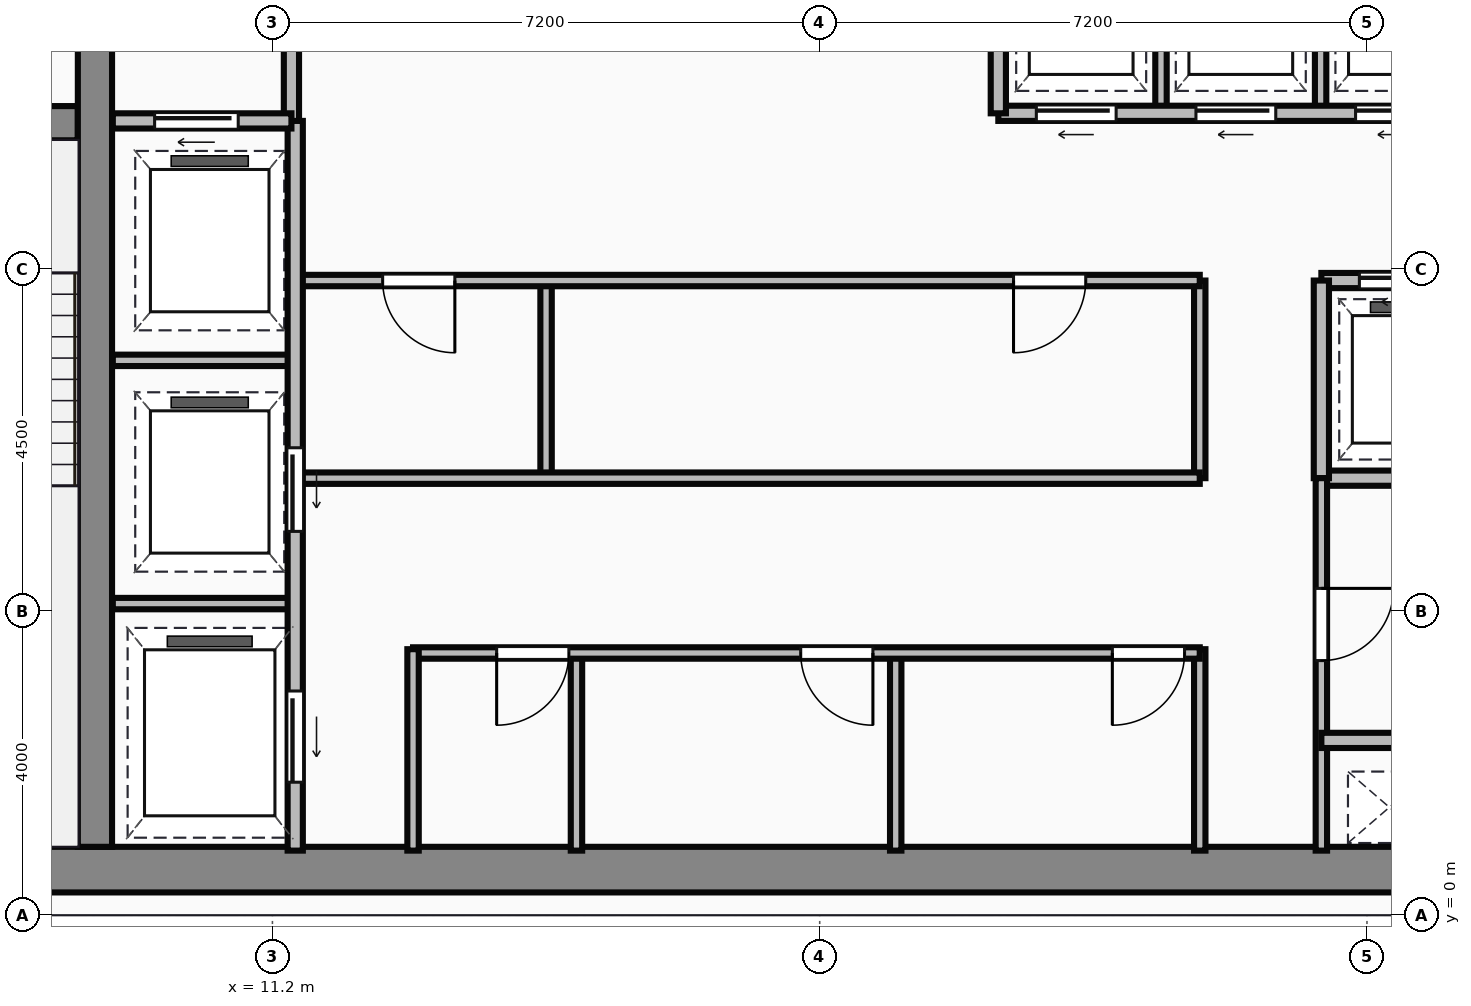
"""IFC4 building model, lengths in metres.
Left out: names, types, materials, properties, quantities, classifications, styles, units other than length and angle.
Written with IfcOpenShell. Run it as: python <this file> out.ifc"""

import sys

from ifc_helpers import new_model, si_unit, direction, frame, frame_2d, origin, place, context, subcontext, project, spatial, rectangle, extrude, source, transform, mapped, element, fill, save


model = new_model("IFC4")
c1 = context("Model", 3, precision=1e-05, world=origin(), true_north=direction((0.0, 1.0)))
c2 = subcontext(c1, "Body", "Model", "MODEL_VIEW")
j1 = project(units=[si_unit("LENGTHUNIT", "METRE"), si_unit("PLANEANGLEUNIT", "RADIAN")], contexts=[c1])
p1 = place(None, origin())
s1 = spatial("IfcSite", under=j1, at=p1, CompositionType="ELEMENT")
p2 = place(p1, origin())
s2 = spatial("IfcBuilding", under=s1, at=p2, CompositionType="ELEMENT")
p3 = place(p2, frame((0.0, 0.0, 240.55)))
s3 = spatial("IfcBuildingStorey", under=s2, at=p3, CompositionType="ELEMENT", Elevation=240.55)
m1 = source(origin(), c2, "Body", "SweptSolid", [
    extrude(rectangle(XDim=29.5, YDim=0.6, at=frame_2d((14.75, 0.0))), origin(), (0.0, 0.0, 1.0), 3.65),
])
p4 = place(p3, frame((4.5, 0.6, 0.0), z_axis=(0.0, 0.0, 1.0), x_axis=(1.0, 0.0, 0.0)))
e1 = element("IfcWall", 1, at=p4, inside=s3, PredefinedType="SHEAR", context=c2, shape_type="MappedRepresentation", body=[
    mapped(m1, transform((0.0, 0.0, 0.0))),
])
m2 = source(origin(), c2, "Body", "SweptSolid", [
    extrude(rectangle(XDim=12.5, YDim=0.45, at=frame_2d((6.25, 0.0))), origin(), (0.0, 0.0, 1.0), 3.65),
])
p5 = place(p3, frame((8.865, 0.9, 0.0), z_axis=(0.0, 0.0, 1.0), x_axis=(0.0, 1.0, 0.0)))
e2 = element("IfcWall", 2, at=p5, inside=s3, PredefinedType="SHEAR", context=c2, shape_type="MappedRepresentation", body=[
    mapped(m2, transform((0.0, 0.0, 0.0))),
])
m3 = source(origin(), c2, "Body", "SweptSolid", [
    extrude(rectangle(XDim=3.39, YDim=0.45, at=frame_2d((1.695, 0.0))), origin(), (0.0, 0.0, 1.0), 3.65),
])
p6 = place(p3, frame((5.25, 10.42, 0.0), z_axis=(0.0, 0.0, 1.0), x_axis=(1.0, 0.0, 0.0)))
e3 = element("IfcWall", 3, at=p6, inside=s3, PredefinedType="SHEAR", context=c2, shape_type="MappedRepresentation", body=[
    mapped(m3, transform((0.0, 0.0, 0.0))),
])
p7 = place(p6, frame((1.05, 0.0, 0.0)))
e4 = element("IfcOpeningElement", 4, at=p7, cuts=e3, PredefinedType="OPENING", context=c2, shape_type="SweptSolid", body=[
    extrude(rectangle(XDim=1.1, YDim=2.15, at=frame_2d((0.55, 1.075))), frame((0.0, 0.235, 0.0), z_axis=(0.0, -1.0, 0.0), x_axis=(1.0, 0.0, 0.0)), (0.0, 0.0, 1.0), 0.47),
])
m4 = source(origin(), c2, "Body", "SweptSolid", [
    extrude(rectangle(XDim=3.18, YDim=0.2, at=frame_2d((1.59, 0.0))), origin(), (0.0, 0.0, 1.0), 3.4),
])
p8 = place(p3, frame((11.45, 10.42, 0.0), z_axis=(0.0, 0.0, 1.0), x_axis=(0.0, 1.0, 0.0)))
e5 = element("IfcWall", 5, at=p8, inside=s3, PredefinedType="PARTITIONING", context=c2, shape_type="MappedRepresentation", body=[
    mapped(m4, transform((0.0, 0.0, 0.0))),
])
m5 = source(origin(), c2, "Body", "SweptSolid", [
    extrude(rectangle(XDim=2.35, YDim=0.2, at=frame_2d((1.175, 0.0))), origin(), (0.0, 0.0, 1.0), 3.4),
])
p9 = place(p3, frame((9.1, 10.45, 0.0), z_axis=(0.0, 0.0, 1.0), x_axis=(1.0, 0.0, 0.0)))
e6 = element("IfcWall", 6, at=p9, inside=s3, PredefinedType="PARTITIONING", context=c2, shape_type="MappedRepresentation", body=[
    mapped(m5, transform((0.0, 0.0, 0.0))),
])
p10 = place(p9, frame((0.55, 0.0, 0.0)))
e7 = element("IfcOpeningElement", 7, at=p10, cuts=e6, PredefinedType="OPENING", context=c2, shape_type="SweptSolid", body=[
    extrude(rectangle(XDim=1.1, YDim=2.15, at=frame_2d((0.55, 1.075))), frame((0.0, 0.11, 0.0), z_axis=(0.0, -1.0, 0.0), x_axis=(1.0, 0.0, 0.0)), (0.0, 0.0, 1.0), 0.22),
])
m6 = source(origin(), c2, "Body", "SweptSolid", [
    extrude(rectangle(XDim=9.6, YDim=0.2, at=frame_2d((4.8, 0.0))), origin(), (0.0, 0.0, 1.0), 3.4),
])
p11 = place(p3, frame((11.5, 0.85, 0.0), z_axis=(0.0, 0.0, 1.0), x_axis=(0.0, 1.0, 0.0)))
e8 = element("IfcWall", 8, at=p11, inside=s3, PredefinedType="PARTITIONING", context=c2, shape_type="MappedRepresentation", body=[
    mapped(m6, transform((0.0, 0.0, 0.0))),
])
p12 = place(p11, frame((4.2, 0.0, 0.0)))
e9 = element("IfcOpeningElement", 9, at=p12, cuts=e8, PredefinedType="OPENING", context=c2, shape_type="SweptSolid", body=[
    extrude(rectangle(XDim=1.1, YDim=2.15, at=frame_2d((0.55, 1.075))), frame((0.0, 0.11, 0.0), z_axis=(0.0, -1.0, 0.0), x_axis=(1.0, 0.0, 0.0)), (0.0, 0.0, 1.0), 0.22),
])
p13 = place(p11, frame((0.9, 0.0, 0.0)))
e10 = element("IfcOpeningElement", 10, at=p13, cuts=e8, PredefinedType="OPENING", context=c2, shape_type="SweptSolid", body=[
    extrude(rectangle(XDim=1.2, YDim=2.15, at=frame_2d((0.6, 1.075))), frame((0.0, 0.11, 0.0), z_axis=(0.0, -1.0, 0.0), x_axis=(1.0, 0.0, 0.0)), (0.0, 0.0, 1.0), 0.22),
])
m7 = source(origin(), c2, "Body", "SweptSolid", [
    extrude(rectangle(XDim=2.4, YDim=0.15, at=frame_2d((1.2, 0.0))), origin(), (0.0, 0.0, 1.0), 3.4),
])
for number, where, z_axis, x_axis in (
    (11, (9.1, 4.1, 0.0), (0.0, 0.0, 1.0), (1.0, 0.0, 0.0)),
    (12, (9.1, 7.3, 0.0), (0.0, 0.0, 1.0), (1.0, 0.0, 0.0)),
):
    element("IfcWall", number, at=place(p3, frame(where, z_axis=z_axis, x_axis=x_axis)), inside=s3, PredefinedType="PARTITIONING", context=c2, shape_type="MappedRepresentation", body=[
        mapped(m7, transform((0.0, 0.0, 0.0))),
    ])
m8 = source(origin(), c2, "Body", "SweptSolid", [
    extrude(rectangle(XDim=2.65, YDim=0.15, at=frame_2d((1.325, 0.0))), origin(), (0.0, 0.0, 1.0), 3.4),
])
p14 = place(p3, frame((13.05, 0.85, 0.0), z_axis=(0.0, 0.0, 1.0), x_axis=(0.0, 1.0, 0.0)))
e13 = element("IfcWall", 13, at=p14, inside=s3, PredefinedType="PARTITIONING", context=c2, shape_type="MappedRepresentation", body=[
    mapped(m8, transform((0.0, 0.0, 0.0))),
])
m9 = source(origin(), c2, "Body", "SweptSolid", [
    extrude(rectangle(XDim=10.35, YDim=0.15, at=frame_2d((5.175, 0.0))), origin(), (0.0, 0.0, 1.0), 3.4),
])
p15 = place(p3, frame((13.05, 3.45, 0.0), z_axis=(0.0, 0.0, 1.0), x_axis=(1.0, 0.0, 0.0)))
e14 = element("IfcWall", 14, at=p15, inside=s3, PredefinedType="PARTITIONING", context=c2, shape_type="MappedRepresentation", body=[
    mapped(m9, transform((0.0, 0.0, 0.0))),
])
p16 = place(p15, frame((1.1, 0.0, 0.0)))
e15 = element("IfcOpeningElement", 15, at=p16, cuts=e14, PredefinedType="OPENING", context=c2, shape_type="SweptSolid", body=[
    extrude(rectangle(XDim=0.95, YDim=2.15, at=frame_2d((0.475, 1.075))), frame((0.0, 0.085, 0.0), z_axis=(0.0, -1.0, 0.0), x_axis=(1.0, 0.0, 0.0)), (0.0, 0.0, 1.0), 0.17),
])
p17 = place(p15, frame((5.1, 0.0, 0.0)))
e16 = element("IfcOpeningElement", 16, at=p17, cuts=e14, PredefinedType="OPENING", context=c2, shape_type="SweptSolid", body=[
    extrude(rectangle(XDim=0.95, YDim=2.15, at=frame_2d((0.475, 1.075))), frame((0.0, 0.085, 0.0), z_axis=(0.0, -1.0, 0.0), x_axis=(1.0, 0.0, 0.0)), (0.0, 0.0, 1.0), 0.17),
])
p18 = place(p15, frame((9.2, 0.0, 0.0)))
e17 = element("IfcOpeningElement", 17, at=p18, cuts=e14, PredefinedType="OPENING", context=c2, shape_type="SweptSolid", body=[
    extrude(rectangle(XDim=0.95, YDim=2.15, at=frame_2d((0.475, 1.075))), frame((0.0, 0.085, 0.0), z_axis=(0.0, -1.0, 0.0), x_axis=(1.0, 0.0, 0.0)), (0.0, 0.0, 1.0), 0.17),
])
p19 = place(p3, frame((23.4, 0.85, 0.0), z_axis=(0.0, 0.0, 1.0), x_axis=(0.0, 1.0, 0.0)))
e18 = element("IfcWall", 18, at=p19, inside=s3, PredefinedType="PARTITIONING", context=c2, shape_type="MappedRepresentation", body=[
    mapped(m8, transform((0.0, 0.0, 0.0))),
])
m10 = source(origin(), c2, "Body", "SweptSolid", [
    extrude(rectangle(XDim=2.6, YDim=0.15, at=frame_2d((1.3, 0.0))), origin(), (0.0, 0.0, 1.0), 3.4),
])
for number, where, z_axis, x_axis in (
    (19, (15.2, 0.85, 0.0), (0.0, 0.0, 1.0), (0.0, 1.0, 0.0)),
    (20, (19.4, 0.85, 0.0), (0.0, 0.0, 1.0), (0.0, 1.0, 0.0)),
):
    element("IfcWall", number, at=place(p3, frame(where, z_axis=z_axis, x_axis=x_axis)), inside=s3, PredefinedType="PARTITIONING", context=c2, shape_type="MappedRepresentation", body=[
        mapped(m10, transform((0.0, 0.0, 0.0))),
    ])
m11 = source(origin(), c2, "Body", "SweptSolid", [
    extrude(rectangle(XDim=11.85, YDim=0.15, at=frame_2d((5.925, 0.0))), origin(), (0.0, 0.0, 1.0), 3.4),
])
p20 = place(p3, frame((11.55, 5.75, 0.0), z_axis=(0.0, 0.0, 1.0), x_axis=(1.0, 0.0, 0.0)))
e21 = element("IfcWall", 21, at=p20, inside=s3, PredefinedType="PARTITIONING", context=c2, shape_type="MappedRepresentation", body=[
    mapped(m11, transform((0.0, 0.0, 0.0))),
])
p21 = place(p3, frame((11.55, 8.35, 0.0), z_axis=(0.0, 0.0, 1.0), x_axis=(1.0, 0.0, 0.0)))
e22 = element("IfcWall", 22, at=p21, inside=s3, PredefinedType="PARTITIONING", context=c2, shape_type="MappedRepresentation", body=[
    mapped(m11, transform((0.0, 0.0, 0.0))),
])
p22 = place(p21, frame((1.1, 0.0, 0.0)))
e23 = element("IfcOpeningElement", 23, at=p22, cuts=e22, PredefinedType="OPENING", context=c2, shape_type="SweptSolid", body=[
    extrude(rectangle(XDim=0.95, YDim=2.15, at=frame_2d((0.475, 1.075))), frame((0.0, 0.085, 0.0), z_axis=(0.0, -1.0, 0.0), x_axis=(1.0, 0.0, 0.0)), (0.0, 0.0, 1.0), 0.17),
])
p23 = place(p21, frame((9.4, 0.0, 0.0)))
e24 = element("IfcOpeningElement", 24, at=p23, cuts=e22, PredefinedType="OPENING", context=c2, shape_type="SweptSolid", body=[
    extrude(rectangle(XDim=0.95, YDim=2.15, at=frame_2d((0.475, 1.075))), frame((0.0, 0.085, 0.0), z_axis=(0.0, -1.0, 0.0), x_axis=(1.0, 0.0, 0.0)), (0.0, 0.0, 1.0), 0.17),
])
m12 = source(origin(), c2, "Body", "SweptSolid", [
    extrude(rectangle(XDim=2.6, YDim=0.15, at=frame_2d((1.3, 0.0))), origin(), (0.0, 0.0, 1.0), 3.4),
])
p24 = place(p3, frame((23.4, 5.75, 0.0), z_axis=(0.0, 0.0, 1.0), x_axis=(0.0, 1.0, 0.0)))
e25 = element("IfcWall", 25, at=p24, inside=s3, PredefinedType="PARTITIONING", context=c2, shape_type="MappedRepresentation", body=[
    mapped(m12, transform((0.0, 0.0, 0.0))),
])
m13 = source(origin(), c2, "Body", "SweptSolid", [
    extrude(rectangle(XDim=2.5, YDim=0.15, at=frame_2d((1.25, 0.0))), origin(), (0.0, 0.0, 1.0), 3.4),
])
p25 = place(p3, frame((14.8, 5.8, 0.0), z_axis=(0.0, 0.0, 1.0), x_axis=(0.0, 1.0, 0.0)))
e26 = element("IfcWall", 26, at=p25, inside=s3, PredefinedType="PARTITIONING", context=c2, shape_type="MappedRepresentation", body=[
    mapped(m13, transform((0.0, 0.0, 0.0))),
])
m14 = source(origin(), c2, "Body", "SweptSolid", [
    extrude(rectangle(XDim=8.8, YDim=0.2, at=frame_2d((4.4, 0.0))), origin(), (0.0, 0.0, 1.0), 3.4),
])
p26 = place(p3, frame((20.75, 10.55, 0.0), z_axis=(0.0, 0.0, 1.0), x_axis=(1.0, 0.0, 0.0)))
e27 = element("IfcWall", 27, at=p26, inside=s3, PredefinedType="PARTITIONING", context=c2, shape_type="MappedRepresentation", body=[
    mapped(m14, transform((0.0, 0.0, 0.0))),
])
p27 = place(p26, frame((0.5, 0.0, 0.0)))
e28 = element("IfcOpeningElement", 28, at=p27, cuts=e27, PredefinedType="OPENING", context=c2, shape_type="SweptSolid", body=[
    extrude(rectangle(XDim=1.05, YDim=2.15, at=frame_2d((0.525, 1.075))), frame((0.0, 0.11, 0.0), z_axis=(0.0, -1.0, 0.0), x_axis=(1.0, 0.0, 0.0)), (0.0, 0.0, 1.0), 0.22),
])
p28 = place(p26, frame((2.6, 0.0, 0.0)))
e29 = element("IfcOpeningElement", 29, at=p28, cuts=e27, PredefinedType="OPENING", context=c2, shape_type="SweptSolid", body=[
    extrude(rectangle(XDim=1.05, YDim=2.15, at=frame_2d((0.525, 1.075))), frame((0.0, 0.11, 0.0), z_axis=(0.0, -1.0, 0.0), x_axis=(1.0, 0.0, 0.0)), (0.0, 0.0, 1.0), 0.22),
])
p29 = place(p26, frame((4.7, 0.0, 0.0)))
e30 = element("IfcOpeningElement", 30, at=p29, cuts=e27, PredefinedType="OPENING", context=c2, shape_type="SweptSolid", body=[
    extrude(rectangle(XDim=1.05, YDim=2.15, at=frame_2d((0.525, 1.075))), frame((0.0, 0.11, 0.0), z_axis=(0.0, -1.0, 0.0), x_axis=(1.0, 0.0, 0.0)), (0.0, 0.0, 1.0), 0.22),
])
p30 = place(p26, frame((6.8, 0.0, 0.0)))
e31 = element("IfcOpeningElement", 31, at=p30, cuts=e27, PredefinedType="OPENING", context=c2, shape_type="SweptSolid", body=[
    extrude(rectangle(XDim=1.05, YDim=2.15, at=frame_2d((0.525, 1.075))), frame((0.0, 0.11, 0.0), z_axis=(0.0, -1.0, 0.0), x_axis=(1.0, 0.0, 0.0)), (0.0, 0.0, 1.0), 0.22),
])
m15 = source(origin(), c2, "Body", "SweptSolid", [
    extrude(rectangle(XDim=3.0, YDim=0.2, at=frame_2d((1.5, 0.0))), origin(), (0.0, 0.0, 1.0), 3.4),
])
p31 = place(p3, frame((20.75, 10.55, 0.0), z_axis=(0.0, 0.0, 1.0), x_axis=(0.0, 1.0, 0.0)))
e32 = element("IfcWall", 32, at=p31, inside=s3, PredefinedType="PARTITIONING", context=c2, shape_type="MappedRepresentation", body=[
    mapped(m15, transform((0.0, 0.0, 0.0))),
])
m16 = source(origin(), c2, "Body", "SweptSolid", [
    extrude(rectangle(XDim=2.85, YDim=0.15, at=frame_2d((1.425, 0.0))), origin(), (0.0, 0.0, 1.0), 3.4),
])
for number, where, z_axis, x_axis in (
    (33, (22.89, 10.6, 0.0), (0.0, 0.0, 1.0), (0.0, 1.0, 0.0)),
    (34, (24.99, 10.6, 0.0), (0.0, 0.0, 1.0), (0.0, 1.0, 0.0)),
):
    element("IfcWall", number, at=place(p3, frame(where, z_axis=z_axis, x_axis=x_axis)), inside=s3, PredefinedType="PARTITIONING", context=c2, shape_type="MappedRepresentation", body=[
        mapped(m16, transform((0.0, 0.0, 0.0))),
    ])
m17 = source(origin(), c2, "Body", "SweptSolid", [
    extrude(rectangle(XDim=4.55, YDim=0.2, at=frame_2d((2.275, 0.0))), origin(), (0.0, 0.0, 1.0), 3.4),
])
p32 = place(p3, frame((25.0, 8.35, 0.0), z_axis=(0.0, 0.0, 1.0), x_axis=(1.0, 0.0, 0.0)))
e35 = element("IfcWall", 35, at=p32, inside=s3, PredefinedType="PARTITIONING", context=c2, shape_type="MappedRepresentation", body=[
    mapped(m17, transform((0.0, 0.0, 0.0))),
])
p33 = place(p32, frame((0.5, 0.0, 0.0)))
e36 = element("IfcOpeningElement", 36, at=p33, cuts=e35, PredefinedType="OPENING", context=c2, shape_type="SweptSolid", body=[
    extrude(rectangle(XDim=1.05, YDim=2.15, at=frame_2d((0.525, 1.075))), frame((0.0, 0.11, 0.0), z_axis=(0.0, -1.0, 0.0), x_axis=(1.0, 0.0, 0.0)), (0.0, 0.0, 1.0), 0.22),
])
p34 = place(p32, frame((2.6, 0.0, 0.0)))
e37 = element("IfcOpeningElement", 37, at=p34, cuts=e35, PredefinedType="OPENING", context=c2, shape_type="SweptSolid", body=[
    extrude(rectangle(XDim=1.05, YDim=2.15, at=frame_2d((0.525, 1.075))), frame((0.0, 0.11, 0.0), z_axis=(0.0, -1.0, 0.0), x_axis=(1.0, 0.0, 0.0)), (0.0, 0.0, 1.0), 0.22),
])
p35 = place(p3, frame((25.0, 5.75, 0.0), z_axis=(0.0, 0.0, 1.0), x_axis=(1.0, 0.0, 0.0)))
e38 = element("IfcWall", 38, at=p35, inside=s3, PredefinedType="PARTITIONING", context=c2, shape_type="MappedRepresentation", body=[
    mapped(m17, transform((0.0, 0.0, 0.0))),
])
m18 = source(origin(), c2, "Body", "SweptSolid", [
    extrude(rectangle(XDim=2.6, YDim=0.2, at=frame_2d((1.3, 0.0))), origin(), (0.0, 0.0, 1.0), 3.4),
])
p36 = place(p3, frame((25.0, 5.75, 0.0), z_axis=(0.0, 0.0, 1.0), x_axis=(0.0, 1.0, 0.0)))
e39 = element("IfcWall", 39, at=p36, inside=s3, PredefinedType="PARTITIONING", context=c2, shape_type="MappedRepresentation", body=[
    mapped(m18, transform((0.0, 0.0, 0.0))),
])
m19 = source(origin(), c2, "Body", "SweptSolid", [
    extrude(rectangle(XDim=4.9, YDim=0.15, at=frame_2d((2.45, 0.0))), origin(), (0.0, 0.0, 1.0), 3.4),
])
p37 = place(p3, frame((25.0, 0.85, 0.0), z_axis=(0.0, 0.0, 1.0), x_axis=(0.0, 1.0, 0.0)))
e40 = element("IfcWall", 40, at=p37, inside=s3, PredefinedType="PARTITIONING", context=c2, shape_type="MappedRepresentation", body=[
    mapped(m19, transform((0.0, 0.0, 0.0))),
])
p38 = place(p37, frame((2.5, 0.0, 0.0)))
e41 = element("IfcOpeningElement", 41, at=p38, cuts=e40, PredefinedType="OPENING", context=c2, shape_type="SweptSolid", body=[
    extrude(rectangle(XDim=0.95, YDim=2.15, at=frame_2d((0.475, 1.075))), frame((0.0, 0.085, 0.0), z_axis=(0.0, -1.0, 0.0), x_axis=(1.0, 0.0, 0.0)), (0.0, 0.0, 1.0), 0.17),
])
m20 = source(origin(), c2, "Body", "SweptSolid", [
    extrude(rectangle(XDim=2.4, YDim=0.2, at=frame_2d((1.2, 0.0))), origin(), (0.0, 0.0, 1.0), 3.4),
])
p39 = place(p3, frame((25.0, 2.3, 0.0), z_axis=(0.0, 0.0, 1.0), x_axis=(1.0, 0.0, 0.0)))
e42 = element("IfcWall", 42, at=p39, inside=s3, PredefinedType="PARTITIONING", context=c2, shape_type="MappedRepresentation", body=[
    mapped(m20, transform((0.0, 0.0, 0.0))),
])
m21 = source(origin(), c2, "Body", "SweptSolid", [
    extrude(rectangle(XDim=1.1, YDim=2.15, at=frame_2d((0.55, 1.075))), frame((0.0, 0.025, 0.0), z_axis=(0.0, -1.0, 0.0), x_axis=(1.0, 0.0, 0.0)), (0.0, 0.0, 1.0), 0.05),
])
p40 = place(p10, origin())
e43 = element("IfcDoor", 43, at=p40, inside=s3, OperationType="SLIDING_TO_LEFT", PredefinedType="DOOR", context=c2, shape_type="MappedRepresentation", body=[
    mapped(m21, transform((0.0, 0.0, 0.0))),
])
fill(e7, e43)
p41 = place(p12, frame((1.1, 0.0, 0.0), z_axis=(0.0, 0.0, 1.0), x_axis=(-1.0, 0.0, 0.0)))
e44 = element("IfcDoor", 44, at=p41, inside=s3, OperationType="SLIDING_TO_LEFT", PredefinedType="DOOR", context=c2, shape_type="MappedRepresentation", body=[
    mapped(m21, transform((0.0, 0.0, 0.0))),
])
fill(e9, e44)
m22 = source(origin(), c2, "Body", "SweptSolid", [
    extrude(rectangle(XDim=1.2, YDim=2.15, at=frame_2d((0.6, 1.075))), frame((0.0, 0.025, 0.0), z_axis=(0.0, -1.0, 0.0), x_axis=(1.0, 0.0, 0.0)), (0.0, 0.0, 1.0), 0.05),
])
p42 = place(p13, frame((1.2, 0.0, 0.0), z_axis=(0.0, 0.0, 1.0), x_axis=(-1.0, 0.0, 0.0)))
e45 = element("IfcDoor", 45, at=p42, inside=s3, OperationType="SLIDING_TO_LEFT", PredefinedType="DOOR", context=c2, shape_type="MappedRepresentation", body=[
    mapped(m22, transform((0.0, 0.0, 0.0))),
])
fill(e10, e45)
m23 = source(origin(), c2, "Body", "SweptSolid", [
    extrude(rectangle(XDim=0.95, YDim=2.15, at=frame_2d((0.475, 1.075))), frame((0.0, 0.025, 0.0), z_axis=(0.0, -1.0, 0.0), x_axis=(1.0, 0.0, 0.0)), (0.0, 0.0, 1.0), 0.05),
])
p43 = place(p16, origin())
e46 = element("IfcDoor", 46, at=p43, inside=s3, OperationType="SINGLE_SWING_LEFT", PredefinedType="DOOR", context=c2, shape_type="MappedRepresentation", body=[
    mapped(m23, transform((0.0, 0.0, 0.0))),
])
fill(e15, e46)
p44 = place(p17, origin())
e47 = element("IfcDoor", 47, at=p44, inside=s3, OperationType="SINGLE_SWING_RIGHT", PredefinedType="DOOR", context=c2, shape_type="MappedRepresentation", body=[
    mapped(m23, transform((0.0, 0.0, 0.0))),
])
fill(e16, e47)
p45 = place(p18, origin())
e48 = element("IfcDoor", 48, at=p45, inside=s3, OperationType="SINGLE_SWING_LEFT", PredefinedType="DOOR", context=c2, shape_type="MappedRepresentation", body=[
    mapped(m23, transform((0.0, 0.0, 0.0))),
])
fill(e17, e48)
p46 = place(p22, origin())
e49 = element("IfcDoor", 49, at=p46, inside=s3, OperationType="SINGLE_SWING_RIGHT", PredefinedType="DOOR", context=c2, shape_type="MappedRepresentation", body=[
    mapped(m23, transform((0.0, 0.0, 0.0))),
])
fill(e23, e49)
p47 = place(p23, origin())
e50 = element("IfcDoor", 50, at=p47, inside=s3, OperationType="SINGLE_SWING_LEFT", PredefinedType="DOOR", context=c2, shape_type="MappedRepresentation", body=[
    mapped(m23, transform((0.0, 0.0, 0.0))),
])
fill(e24, e50)
m24 = source(origin(), c2, "Body", "SweptSolid", [
    extrude(rectangle(XDim=1.05, YDim=2.15, at=frame_2d((0.525, 1.075))), frame((0.0, 0.025, 0.0), z_axis=(0.0, -1.0, 0.0), x_axis=(1.0, 0.0, 0.0)), (0.0, 0.0, 1.0), 0.05),
])
p48 = place(p27, frame((1.05, 0.0, 0.0), z_axis=(0.0, 0.0, 1.0), x_axis=(-1.0, 0.0, 0.0)))
e51 = element("IfcDoor", 51, at=p48, inside=s3, OperationType="SLIDING_TO_LEFT", PredefinedType="DOOR", context=c2, shape_type="MappedRepresentation", body=[
    mapped(m24, transform((0.0, 0.0, 0.0))),
])
fill(e28, e51)
p49 = place(p28, frame((1.05, 0.0, 0.0), z_axis=(0.0, 0.0, 1.0), x_axis=(-1.0, 0.0, 0.0)))
e52 = element("IfcDoor", 52, at=p49, inside=s3, OperationType="SLIDING_TO_LEFT", PredefinedType="DOOR", context=c2, shape_type="MappedRepresentation", body=[
    mapped(m24, transform((0.0, 0.0, 0.0))),
])
fill(e29, e52)
p50 = place(p29, frame((1.05, 0.0, 0.0), z_axis=(0.0, 0.0, 1.0), x_axis=(-1.0, 0.0, 0.0)))
e53 = element("IfcDoor", 53, at=p50, inside=s3, OperationType="SLIDING_TO_LEFT", PredefinedType="DOOR", context=c2, shape_type="MappedRepresentation", body=[
    mapped(m24, transform((0.0, 0.0, 0.0))),
])
fill(e30, e53)
p51 = place(p33, origin())
e54 = element("IfcDoor", 54, at=p51, inside=s3, OperationType="SLIDING_TO_LEFT", PredefinedType="DOOR", context=c2, shape_type="MappedRepresentation", body=[
    mapped(m24, transform((0.0, 0.0, 0.0))),
])
fill(e36, e54)
p52 = place(p38, origin())
e55 = element("IfcDoor", 55, at=p52, inside=s3, OperationType="SINGLE_SWING_RIGHT", PredefinedType="DOOR", context=c2, shape_type="MappedRepresentation", body=[
    mapped(m23, transform((0.0, 0.0, 0.0))),
])
fill(e41, e55)
save(model, sys.argv[1])
